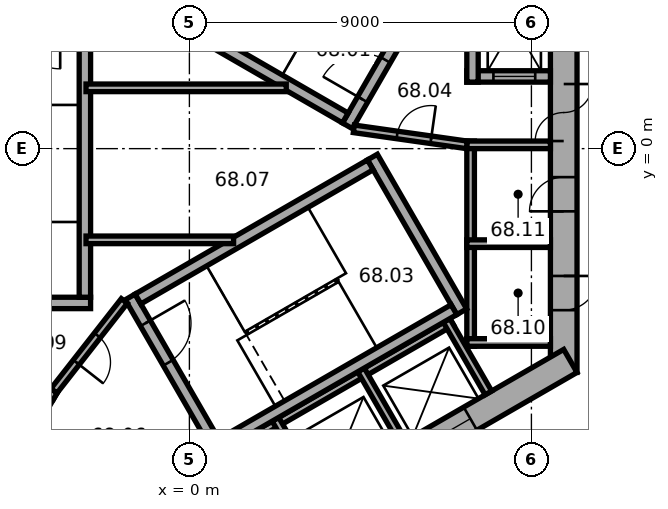
"""IFC4 building model, lengths in metres.
Left out: names, types, materials, properties, quantities, classifications, styles, units other than length and angle.
Written with IfcOpenShell. Run it as: python <this file> out.ifc"""

import sys

from ifc_helpers import new_model, si_unit, direction, frame, frame_2d, origin, place, context, subcontext, project, spatial, rectangle, extrude, element, fill, save


model = new_model("IFC4")
c1 = context("Model", 3, precision=1e-05, world=origin(), true_north=direction((0.0, 1.0)))
c2 = subcontext(c1, "Body", "Model", "MODEL_VIEW")
j1 = project(units=[si_unit("LENGTHUNIT", "METRE"), si_unit("PLANEANGLEUNIT", "RADIAN")], contexts=[c1])
p1 = place(None, origin())
s1 = spatial("IfcSite", under=j1, at=p1, CompositionType="ELEMENT")
p2 = place(p1, origin())
s2 = spatial("IfcBuilding", under=s1, at=p2, CompositionType="ELEMENT")
p3 = place(p2, frame((0.0, 0.0, 274.6)))
s3 = spatial("IfcBuildingStorey", under=s2, at=p3, CompositionType="ELEMENT", Elevation=274.6)
p4 = place(p3, frame((9.85, -5.889, 0.0), z_axis=(0.0, 0.0, 1.0), x_axis=(0.0, 1.0, 0.0)))
e1 = element("IfcWall", 1, at=p4, inside=s3, PredefinedType="SHEAR", context=c2, shape_type="SweptSolid", body=[
    extrude(rectangle(XDim=11.778, YDim=0.7, at=frame_2d((5.889, 0.0))), origin(), (0.0, 0.0, 1.0), 3.7),
])
p5 = place(p4, frame((6.089, 0.0, 0.0)))
e2 = element("IfcOpeningElement", 2, at=p5, cuts=e1, PredefinedType="OPENING", context=c2, shape_type="SweptSolid", body=[
    extrude(rectangle(XDim=1.5, YDim=2.1, at=frame_2d((0.75, 1.05))), frame((0.0, 0.36, 0.0), z_axis=(0.0, -1.0, 0.0), x_axis=(1.0, 0.0, 0.0)), (0.0, 0.0, 1.0), 0.72),
])
p6 = place(p4, frame((1.639, 0.0, 0.0)))
e3 = element("IfcOpeningElement", 3, at=p6, cuts=e1, PredefinedType="OPENING", context=c2, shape_type="SweptSolid", body=[
    extrude(rectangle(XDim=0.9, YDim=2.1, at=frame_2d((0.45, 1.05))), frame((0.0, 0.36, 0.0), z_axis=(0.0, -1.0, 0.0), x_axis=(1.0, 0.0, 0.0)), (0.0, 0.0, 1.0), 0.72),
])
p7 = place(p4, frame((4.239, 0.0, 0.0)))
e4 = element("IfcOpeningElement", 4, at=p7, cuts=e1, PredefinedType="OPENING", context=c2, shape_type="SweptSolid", body=[
    extrude(rectangle(XDim=0.9, YDim=2.1, at=frame_2d((0.45, 1.05))), frame((0.0, 0.36, 0.0), z_axis=(0.0, -1.0, 0.0), x_axis=(1.0, 0.0, 0.0)), (0.0, 0.0, 1.0), 0.72),
])
p8 = place(p3, frame((-10.025, -5.586, 0.0), z_axis=(0.0, 0.0, 1.0), x_axis=(0.866026453023, -0.499998182661, 0.0)))
e5 = element("IfcWall", 5, at=p8, inside=s3, PredefinedType="SHEAR", context=c2, shape_type="SweptSolid", body=[
    extrude(rectangle(XDim=11.778, YDim=0.7, at=frame_2d((5.889, 0.0))), origin(), (0.0, 0.0, 1.0), 3.7),
])
p9 = place(p8, frame((6.089, 0.0, 0.0)))
e6 = element("IfcOpeningElement", 6, at=p9, cuts=e5, PredefinedType="OPENING", context=c2, shape_type="SweptSolid", body=[
    extrude(rectangle(XDim=1.5, YDim=2.1, at=frame_2d((0.75, 1.05))), frame((0.0, 0.36, 0.0), z_axis=(0.0, -1.0, 0.0), x_axis=(1.0, 0.0, 0.0)), (0.0, 0.0, 1.0), 0.72),
])
p10 = place(p8, frame((1.539, 0.0, 0.0)))
e7 = element("IfcOpeningElement", 7, at=p10, cuts=e5, PredefinedType="OPENING", context=c2, shape_type="SweptSolid", body=[
    extrude(rectangle(XDim=1.1, YDim=2.1, at=frame_2d((0.55, 1.05))), frame((0.0, 0.36, 0.0), z_axis=(0.0, -1.0, 0.0), x_axis=(1.0, 0.0, 0.0)), (0.0, 0.0, 1.0), 0.72),
])
p11 = place(p8, frame((4.139, 0.0, 0.0)))
e8 = element("IfcOpeningElement", 8, at=p11, cuts=e5, PredefinedType="OPENING", context=c2, shape_type="SweptSolid", body=[
    extrude(rectangle(XDim=1.1, YDim=2.1, at=frame_2d((0.55, 1.05))), frame((0.0, 0.36, 0.0), z_axis=(0.0, -1.0, 0.0), x_axis=(1.0, 0.0, 0.0)), (0.0, 0.0, 1.0), 0.72),
])
p12 = place(p3, frame((-0.175, -11.475, 0.0), z_axis=(0.0, 0.0, 1.0), x_axis=(0.866026453023, 0.499998182661, 0.0)))
e9 = element("IfcWall", 9, at=p12, inside=s3, PredefinedType="SHEAR", context=c2, shape_type="SweptSolid", body=[
    extrude(rectangle(XDim=11.778, YDim=0.7, at=frame_2d((5.889, 0.0))), origin(), (0.0, 0.0, 1.0), 3.7),
])
p13 = place(p12, frame((2.439, 0.0, 0.0)))
e10 = element("IfcOpeningElement", 10, at=p13, cuts=e9, PredefinedType="OPENING", context=c2, shape_type="SweptSolid", body=[
    extrude(rectangle(XDim=1.1, YDim=2.1, at=frame_2d((0.55, 1.05))), frame((0.0, 0.36, 0.0), z_axis=(0.0, -1.0, 0.0), x_axis=(1.0, 0.0, 0.0)), (0.0, 0.0, 1.0), 0.72),
])
p14 = place(p12, frame((5.039, 0.0, 0.0)))
e11 = element("IfcOpeningElement", 11, at=p14, cuts=e9, PredefinedType="OPENING", context=c2, shape_type="SweptSolid", body=[
    extrude(rectangle(XDim=1.1, YDim=2.1, at=frame_2d((0.55, 1.05))), frame((0.0, 0.36, 0.0), z_axis=(0.0, -1.0, 0.0), x_axis=(1.0, 0.0, 0.0)), (0.0, 0.0, 1.0), 0.72),
])
p15 = place(p12, frame((7.639, 0.0, 0.0)))
e12 = element("IfcOpeningElement", 12, at=p15, cuts=e9, PredefinedType="OPENING", context=c2, shape_type="SweptSolid", body=[
    extrude(rectangle(XDim=1.1, YDim=2.1, at=frame_2d((0.55, 1.05))), frame((0.0, 0.36, 0.0), z_axis=(0.0, -1.0, 0.0), x_axis=(1.0, 0.0, 0.0)), (0.0, 0.0, 1.0), 0.72),
])
p16 = place(p3, frame((7.4, -5.2, 0.0), z_axis=(0.0, 0.0, 1.0), x_axis=(0.0, 1.0, 0.0)))
e13 = element("IfcWall", 13, at=p16, inside=s3, PredefinedType="PARTITIONING", context=c2, shape_type="SweptSolid", body=[
    extrude(rectangle(XDim=5.4, YDim=0.2, at=frame_2d((2.7, 0.0))), origin(), (0.0, 0.0, 1.0), 3.35),
])
for number, where, z_axis, x_axis in (
    (14, (7.3, -5.1, 0.0), (0.0, 0.0, 1.0), (1.0, 0.0, 0.0)),
    (15, (7.3, -2.5, 0.0), (0.0, 0.0, 1.0), (1.0, 0.0, 0.0)),
    (16, (7.3, 0.1, 0.0), (0.0, 0.0, 1.0), (1.0, 0.0, 0.0)),
):
    element("IfcWall", number, at=place(p3, frame(where, z_axis=z_axis, x_axis=x_axis)), inside=s3, PredefinedType="PARTITIONING", context=c2, shape_type="SweptSolid", body=[
        extrude(rectangle(XDim=2.2, YDim=0.2, at=frame_2d((1.1, 0.0))), origin(), (0.0, 0.0, 1.0), 3.35),
    ])
p17 = place(p3, frame((-8.203, -3.809, 0.0), z_axis=(0.0, 0.0, 1.0), x_axis=(0.866028230842, -0.499995103361, 0.0)))
e17 = element("IfcWall", 17, at=p17, inside=s3, PredefinedType="PARTITIONING", context=c2, shape_type="SweptSolid", body=[
    extrude(rectangle(XDim=5.4, YDim=0.2, at=frame_2d((2.7, 0.0))), origin(), (0.0, 0.0, 1.0), 3.35),
])
p18 = place(p3, frame((-3.563, -6.372, 0.0), z_axis=(0.0, 0.0, 1.0), x_axis=(-0.499994660107, -0.866028486751, 0.0)))
e18 = element("IfcWall", 18, at=p18, inside=s3, PredefinedType="PARTITIONING", context=c2, shape_type="SweptSolid", body=[
    extrude(rectangle(XDim=2.2, YDim=0.2, at=frame_2d((1.1, 0.0))), origin(), (0.0, 0.0, 1.0), 3.35),
])
p19 = place(p3, frame((-0.024, -8.559, 0.0), z_axis=(0.0, 0.0, 1.0), x_axis=(0.866026010844, 0.49999894854, 0.0)))
e19 = element("IfcWall", 19, at=p19, inside=s3, PredefinedType="PARTITIONING", context=c2, shape_type="SweptSolid", body=[
    extrude(rectangle(XDim=8.0, YDim=0.2, at=frame_2d((4.0, 0.0))), origin(), (0.0, 0.0, 1.0), 3.35),
])
for number, where, z_axis, x_axis in (
    (20, (2.264, -7.122, 0.0), (0.0, 0.0, 1.0), (0.5, -0.866, 0.0)),
    (21, (4.516, -5.822, 0.0), (0.0, 0.0, 1.0), (0.5, -0.866, 0.0)),
    (22, (6.768, -4.522, 0.0), (0.0, 0.0, 1.0), (0.5, -0.866, 0.0)),
):
    element("IfcWall", number, at=place(p3, frame(where, z_axis=z_axis, x_axis=x_axis)), inside=s3, PredefinedType="PARTITIONING", context=c2, shape_type="SweptSolid", body=[
        extrude(rectangle(XDim=2.2, YDim=0.2, at=frame_2d((1.1, 0.0))), origin(), (0.0, 0.0, 1.0), 3.35),
    ])
p20 = place(p3, frame((4.158, 0.602, 0.0), z_axis=(0.0, 0.0, 1.0), x_axis=(0.499977259774, 0.866038532462, 0.0)))
e23 = element("IfcWall", 23, at=p20, inside=s3, PredefinedType="SHEAR", context=c2, shape_type="SweptSolid", body=[
    extrude(rectangle(XDim=4.7, YDim=0.3, at=frame_2d((2.35, 0.0))), origin(), (0.0, 0.0, 1.0), 3.35),
])
p21 = place(p20, frame((0.8, 0.0, 0.0)))
e24 = element("IfcOpeningElement", 24, at=p21, cuts=e23, PredefinedType="OPENING", context=c2, shape_type="SweptSolid", body=[
    extrude(rectangle(XDim=1.2, YDim=2.1, at=frame_2d((0.6, 1.05))), frame((0.0, 0.16, 0.0), z_axis=(0.0, -1.0, 0.0), x_axis=(1.0, 0.0, 0.0)), (0.0, 0.0, 1.0), 0.32),
])
p22 = place(p3, frame((4.103, 0.807, 0.0), z_axis=(0.0, 0.0, 1.0), x_axis=(-0.866027801685, 0.499995846692, 0.0)))
e25 = element("IfcWall", 25, at=p22, inside=s3, PredefinedType="SHEAR", context=c2, shape_type="SweptSolid", body=[
    extrude(rectangle(XDim=7.06, YDim=0.3, at=frame_2d((3.53, 0.0))), origin(), (0.0, 0.0, 1.0), 3.35),
])
p23 = place(p3, frame((-2.6, -4.06, 0.0), z_axis=(0.0, 0.0, 1.0), x_axis=(-1.0, 0.0, 0.0)))
e26 = element("IfcWall", 26, at=p23, inside=s3, PredefinedType="SHEAR", context=c2, shape_type="SweptSolid", body=[
    extrude(rectangle(XDim=4.7, YDim=0.3, at=frame_2d((2.35, 0.0))), origin(), (0.0, 0.0, 1.0), 3.35),
])
p24 = place(p3, frame((-2.75, 3.15, 0.0), z_axis=(0.0, 0.0, 1.0), x_axis=(0.0, -1.0, 0.0)))
e27 = element("IfcWall", 27, at=p24, inside=s3, PredefinedType="SHEAR", context=c2, shape_type="SweptSolid", body=[
    extrude(rectangle(XDim=7.06, YDim=0.3, at=frame_2d((3.53, 0.0))), origin(), (0.0, 0.0, 1.0), 3.35),
])
p25 = place(p3, frame((-1.558, -3.902, 0.0), z_axis=(0.0, 0.0, 1.0), x_axis=(0.499977259774, -0.866038532462, 0.0)))
e28 = element("IfcWall", 28, at=p25, inside=s3, PredefinedType="SHEAR", context=c2, shape_type="SweptSolid", body=[
    extrude(rectangle(XDim=4.7, YDim=0.3, at=frame_2d((2.35, 0.0))), origin(), (0.0, 0.0, 1.0), 3.35),
])
p26 = place(p25, frame((0.8, 0.0, 0.0)))
e29 = element("IfcOpeningElement", 29, at=p26, cuts=e28, PredefinedType="OPENING", context=c2, shape_type="SweptSolid", body=[
    extrude(rectangle(XDim=1.2, YDim=2.1, at=frame_2d((0.6, 1.05))), frame((0.0, 0.16, 0.0), z_axis=(0.0, -1.0, 0.0), x_axis=(1.0, 0.0, 0.0)), (0.0, 0.0, 1.0), 0.32),
])
p27 = place(p3, frame((4.816, -0.222, 0.0), z_axis=(0.0, 0.0, 1.0), x_axis=(0.499977259774, -0.866038532462, 0.0)))
e30 = element("IfcWall", 30, at=p27, inside=s3, PredefinedType="SHEAR", context=c2, shape_type="SweptSolid", body=[
    extrude(rectangle(XDim=4.7, YDim=0.3, at=frame_2d((2.35, 0.0))), origin(), (0.0, 0.0, 1.0), 3.35),
])
for number, where, z_axis, x_axis in (
    (31, (-1.353, -3.957, 0.0), (0.0, 0.0, 1.0), (0.866, 0.5, 0.0)),
    (32, (0.847, -7.767, 0.0), (0.0, 0.0, 1.0), (0.866, 0.5, 0.0)),
):
    element("IfcWall", number, at=place(p3, frame(where, z_axis=z_axis, x_axis=x_axis)), inside=s3, PredefinedType="SHEAR", context=c2, shape_type="SweptSolid", body=[
        extrude(rectangle(XDim=7.06, YDim=0.3, at=frame_2d((3.53, 0.0))), origin(), (0.0, 0.0, 1.0), 3.35),
    ])
p28 = place(p3, frame((7.3, 1.9, 0.0), z_axis=(0.0, 0.0, 1.0), x_axis=(1.0, 0.0, 0.0)))
e33 = element("IfcWall", 33, at=p28, inside=s3, PredefinedType="SHEAR", context=c2, shape_type="SweptSolid", body=[
    extrude(rectangle(XDim=2.2, YDim=0.3, at=frame_2d((1.1, 0.0))), origin(), (0.0, 0.0, 1.0), 3.35),
])
p29 = place(p28, frame((0.7, 0.0, 0.0)))
e34 = element("IfcOpeningElement", 34, at=p29, cuts=e33, PredefinedType="OPENING", context=c2, shape_type="SweptSolid", body=[
    extrude(rectangle(XDim=1.1, YDim=2.1, at=frame_2d((0.55, 1.05))), frame((0.0, 0.16, 0.0), z_axis=(0.0, -1.0, 0.0), x_axis=(1.0, 0.0, 0.0)), (0.0, 0.0, 1.0), 0.32),
])
p30 = place(p3, frame((7.45, 1.75, 0.0), z_axis=(0.0, 0.0, 1.0), x_axis=(0.0, 1.0, 0.0)))
e35 = element("IfcWall", 35, at=p30, inside=s3, PredefinedType="SHEAR", context=c2, shape_type="SweptSolid", body=[
    extrude(rectangle(XDim=3.35, YDim=0.3, at=frame_2d((1.675, 0.0))), origin(), (0.0, 0.0, 1.0), 3.35),
])
p31 = place(p3, frame((4.327, 0.521, 0.0), z_axis=(0.0, 0.0, 1.0), x_axis=(0.990124376366, -0.14019172346, 0.0)))
e36 = element("IfcWall", 36, at=p31, inside=s3, PredefinedType="PARTITIONING", context=c2, shape_type="SweptSolid", body=[
    extrude(rectangle(XDim=3.002, YDim=0.2, at=frame_2d((1.501, 0.0))), origin(), (0.0, 0.0, 1.0), 3.35),
])
p32 = place(p31, frame((1.15, 0.0, 0.0)))
e37 = element("IfcOpeningElement", 37, at=p32, cuts=e36, PredefinedType="OPENING", context=c2, shape_type="SweptSolid", body=[
    extrude(rectangle(XDim=0.9, YDim=2.1, at=frame_2d((0.45, 1.05))), frame((0.0, 0.11, 0.0), z_axis=(0.0, -1.0, 0.0), x_axis=(1.0, 0.0, 0.0)), (0.0, 0.0, 1.0), 0.22),
])
p33 = place(p3, frame((-1.712, -4.008, 0.0), z_axis=(0.0, 0.0, 1.0), x_axis=(-0.616549420702, -0.787316208287, 0.0)))
e38 = element("IfcWall", 38, at=p33, inside=s3, PredefinedType="PARTITIONING", context=c2, shape_type="SweptSolid", body=[
    extrude(rectangle(XDim=3.002, YDim=0.2, at=frame_2d((1.501, 0.0))), origin(), (0.0, 0.0, 1.0), 3.35),
])
p34 = place(p33, frame((1.15, 0.0, 0.0)))
e39 = element("IfcOpeningElement", 39, at=p34, cuts=e38, PredefinedType="OPENING", context=c2, shape_type="SweptSolid", body=[
    extrude(rectangle(XDim=0.9, YDim=2.1, at=frame_2d((0.45, 1.05))), frame((0.0, 0.11, 0.0), z_axis=(0.0, -1.0, 0.0), x_axis=(1.0, 0.0, 0.0)), (0.0, 0.0, 1.0), 0.22),
])
p35 = place(p3, frame((-2.72, -2.4, 0.0), z_axis=(0.0, 0.0, 1.0), x_axis=(1.0, 0.0, 0.0)))
e40 = element("IfcWall", 40, at=p35, inside=s3, PredefinedType="PARTITIONING", context=c2, shape_type="SweptSolid", body=[
    extrude(rectangle(XDim=3.883, YDim=0.2, at=frame_2d((1.941, 0.0))), origin(), (0.0, 0.0, 1.0), 3.35),
])
p36 = place(p3, frame((-2.72, 1.6, 0.0), z_axis=(0.0, 0.0, 1.0), x_axis=(1.0, 0.0, 0.0)))
e41 = element("IfcWall", 41, at=p36, inside=s3, PredefinedType="PARTITIONING", context=c2, shape_type="SweptSolid", body=[
    extrude(rectangle(XDim=5.269, YDim=0.2, at=frame_2d((2.634, 0.0))), origin(), (0.0, 0.0, 1.0), 3.35),
])
p37 = place(p5, origin())
e42 = element("IfcDoor", 42, at=p37, inside=s3, OperationType="DOUBLE_DOOR_SINGLE_SWING", PredefinedType="DOOR", context=c2, shape_type="SweptSolid", body=[
    extrude(rectangle(XDim=1.5, YDim=2.1, at=frame_2d((0.75, 1.05))), frame((0.0, 0.025, 0.0), z_axis=(0.0, -1.0, 0.0), x_axis=(1.0, 0.0, 0.0)), (0.0, 0.0, 1.0), 0.05),
])
fill(e2, e42)
p38 = place(p21, origin())
e43 = element("IfcDoor", 43, at=p38, inside=s3, OperationType="SINGLE_SWING_RIGHT", PredefinedType="DOOR", context=c2, shape_type="SweptSolid", body=[
    extrude(rectangle(XDim=1.2, YDim=2.1, at=frame_2d((0.6, 1.05))), frame((0.0, 0.025, 0.0), z_axis=(0.0, -1.0, 0.0), x_axis=(1.0, 0.0, 0.0)), (0.0, 0.0, 1.0), 0.05),
])
fill(e24, e43)
p39 = place(p26, origin())
e44 = element("IfcDoor", 44, at=p39, inside=s3, OperationType="SINGLE_SWING_RIGHT", PredefinedType="DOOR", context=c2, shape_type="SweptSolid", body=[
    extrude(rectangle(XDim=1.2, YDim=2.1, at=frame_2d((0.6, 1.05))), frame((0.0, 0.025, 0.0), z_axis=(0.0, -1.0, 0.0), x_axis=(1.0, 0.0, 0.0)), (0.0, 0.0, 1.0), 0.05),
])
fill(e29, e44)
p40 = place(p32, origin())
e45 = element("IfcDoor", 45, at=p40, inside=s3, OperationType="SINGLE_SWING_LEFT", PredefinedType="DOOR", context=c2, shape_type="SweptSolid", body=[
    extrude(rectangle(XDim=0.9, YDim=2.1, at=frame_2d((0.45, 1.05))), frame((0.0, 0.025, 0.0), z_axis=(0.0, -1.0, 0.0), x_axis=(1.0, 0.0, 0.0)), (0.0, 0.0, 1.0), 0.05),
])
fill(e37, e45)
p41 = place(p34, origin())
e46 = element("IfcDoor", 46, at=p41, inside=s3, OperationType="SINGLE_SWING_LEFT", PredefinedType="DOOR", context=c2, shape_type="SweptSolid", body=[
    extrude(rectangle(XDim=0.9, YDim=2.1, at=frame_2d((0.45, 1.05))), frame((0.0, 0.025, 0.0), z_axis=(0.0, -1.0, 0.0), x_axis=(1.0, 0.0, 0.0)), (0.0, 0.0, 1.0), 0.05),
])
fill(e39, e46)
p42 = place(p6, origin())
e47 = element("IfcDoor", 47, at=p42, inside=s3, OperationType="SINGLE_SWING_LEFT", PredefinedType="DOOR", context=c2, shape_type="SweptSolid", body=[
    extrude(rectangle(XDim=0.9, YDim=2.1, at=frame_2d((0.45, 1.05))), frame((0.0, 0.025, 0.0), z_axis=(0.0, -1.0, 0.0), x_axis=(1.0, 0.0, 0.0)), (0.0, 0.0, 1.0), 0.05),
])
fill(e3, e47)
p43 = place(p7, origin())
e48 = element("IfcDoor", 48, at=p43, inside=s3, OperationType="SINGLE_SWING_LEFT", PredefinedType="DOOR", context=c2, shape_type="SweptSolid", body=[
    extrude(rectangle(XDim=0.9, YDim=2.1, at=frame_2d((0.45, 1.05))), frame((0.0, 0.025, 0.0), z_axis=(0.0, -1.0, 0.0), x_axis=(1.0, 0.0, 0.0)), (0.0, 0.0, 1.0), 0.05),
])
fill(e4, e48)
p44 = place(p29, origin())
e49 = element("IfcDoor", 49, at=p44, inside=s3, OperationType="DOUBLE_DOOR_SLIDING", PredefinedType="DOOR", context=c2, shape_type="SweptSolid", body=[
    extrude(rectangle(XDim=1.1, YDim=2.1, at=frame_2d((0.55, 1.05))), frame((0.0, 0.025, 0.0), z_axis=(0.0, -1.0, 0.0), x_axis=(1.0, 0.0, 0.0)), (0.0, 0.0, 1.0), 0.05),
])
fill(e34, e49)
p45 = place(p15, origin())
e50 = element("IfcDoor", 50, at=p45, inside=s3, OperationType="DOUBLE_DOOR_SLIDING", PredefinedType="DOOR", context=c2, shape_type="SweptSolid", body=[
    extrude(rectangle(XDim=1.1, YDim=2.1, at=frame_2d((0.55, 1.05))), frame((0.0, 0.025, 0.0), z_axis=(0.0, -1.0, 0.0), x_axis=(1.0, 0.0, 0.0)), (0.0, 0.0, 1.0), 0.05),
])
fill(e12, e50)
save(model, sys.argv[1])
